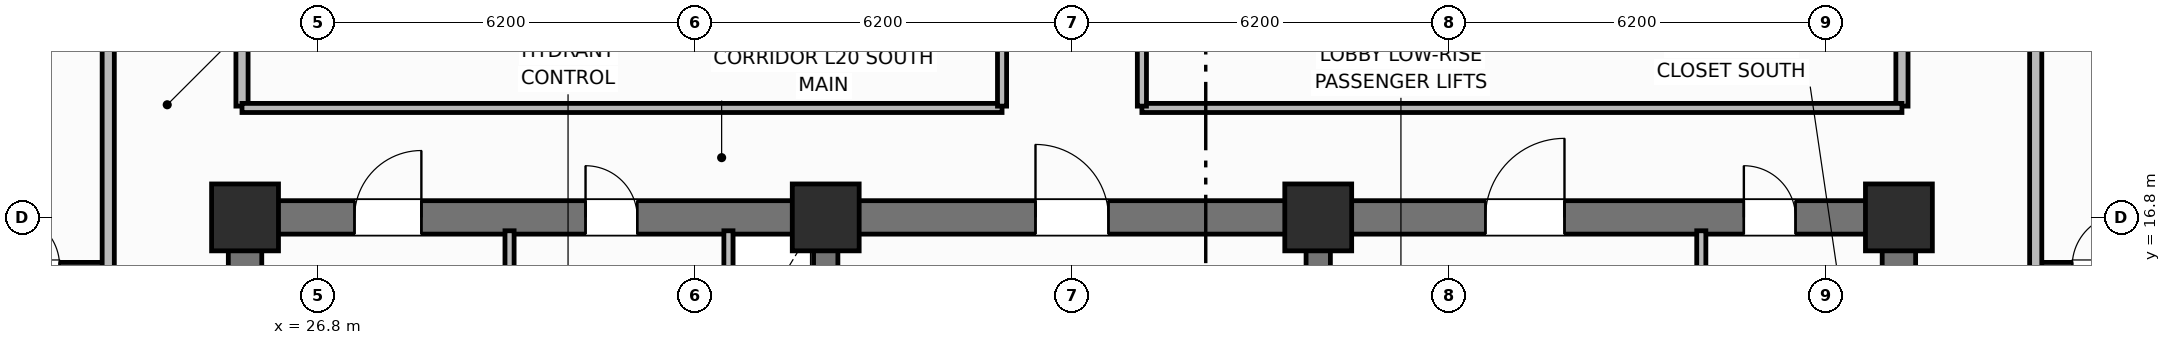
"""IFC4 building model, lengths in metres.
Left out: names, types, materials, properties, quantities, classifications, styles, units other than length and angle.
Written with IfcOpenShell. Run it as: python <this file> out.ifc"""

import sys

from ifc_helpers import new_model, si_unit, direction, frame, frame_2d, origin, origin_2d, place, context, subcontext, project, spatial, rectangle, extrude, element, fill, save


model = new_model("IFC4")
c1 = context("Model", 3, precision=1e-05, world=origin(), true_north=direction((0.0, 1.0)))
c2 = subcontext(c1, "Body", "Model", "MODEL_VIEW")
j1 = project(units=[si_unit("LENGTHUNIT", "METRE"), si_unit("PLANEANGLEUNIT", "RADIAN")], contexts=[c1])
p1 = place(None, origin())
s1 = spatial("IfcSite", under=j1, at=p1, CompositionType="ELEMENT")
p2 = place(p1, origin())
s2 = spatial("IfcBuilding", under=s1, at=p2, CompositionType="ELEMENT")
p3 = place(p2, frame((0.0, 0.0, 84.1)))
s3 = spatial("IfcBuildingStorey", under=s2, at=p3, CompositionType="ELEMENT", Elevation=84.1)
for number, where, z_axis, x_axis in (
    (1, (25.6, 10.875, 0.0), (0.0, 0.0, 1.0), (0.0, 1.0, 0.0)),
    (2, (52.8, 10.875, 0.0), (0.0, 0.0, 1.0), (0.0, 1.0, 0.0)),
):
    element("IfcWall", number, at=place(p3, frame(where, z_axis=z_axis, x_axis=x_axis)), inside=s3, PredefinedType="SHEAR", context=c2, shape_type="SweptSolid", body=[
        extrude(rectangle(XDim=5.65, YDim=0.55, at=frame_2d((2.825, 0.0))), origin(), (0.0, 0.0, 1.0), 4.2),
    ])
p4 = place(p3, frame((25.6, 16.8, 0.0), z_axis=(0.0, 0.0, 1.0), x_axis=(1.0, 0.0, 0.0)))
e3 = element("IfcWall", 3, at=p4, inside=s3, PredefinedType="SHEAR", context=c2, shape_type="SweptSolid", body=[
    extrude(rectangle(XDim=27.2, YDim=0.55, at=frame_2d((13.6, 0.0))), origin(), (0.0, 0.0, 1.0), 4.2),
])
p5 = place(p4, frame((1.8, 0.0, 0.0)))
e4 = element("IfcOpeningElement", 4, at=p5, cuts=e3, PredefinedType="OPENING", context=c2, shape_type="SweptSolid", body=[
    extrude(rectangle(XDim=1.1, YDim=2.15, at=frame_2d((0.55, 1.075))), frame((0.0, 0.285, 0.0), z_axis=(0.0, -1.0, 0.0), x_axis=(1.0, 0.0, 0.0)), (0.0, 0.0, 1.0), 0.57),
])
p6 = place(p4, frame((5.6, 0.0, 0.0)))
e5 = element("IfcOpeningElement", 5, at=p6, cuts=e3, PredefinedType="OPENING", context=c2, shape_type="SweptSolid", body=[
    extrude(rectangle(XDim=0.85, YDim=2.1, at=frame_2d((0.425, 1.05))), frame((0.0, 0.285, 0.0), z_axis=(0.0, -1.0, 0.0), x_axis=(1.0, 0.0, 0.0)), (0.0, 0.0, 1.0), 0.57),
])
p7 = place(p4, frame((13.0, 0.0, 0.0)))
e6 = element("IfcOpeningElement", 6, at=p7, cuts=e3, PredefinedType="OPENING", context=c2, shape_type="SweptSolid", body=[
    extrude(rectangle(XDim=1.2, YDim=2.15, at=frame_2d((0.6, 1.075))), frame((0.0, 0.285, 0.0), z_axis=(0.0, -1.0, 0.0), x_axis=(1.0, 0.0, 0.0)), (0.0, 0.0, 1.0), 0.57),
])
p8 = place(p4, frame((20.4, 0.0, 0.0)))
e7 = element("IfcOpeningElement", 7, at=p8, cuts=e3, PredefinedType="OPENING", context=c2, shape_type="SweptSolid", body=[
    extrude(rectangle(XDim=1.3, YDim=2.2, at=frame_2d((0.65, 1.1))), frame((0.0, 0.285, 0.0), z_axis=(0.0, -1.0, 0.0), x_axis=(1.0, 0.0, 0.0)), (0.0, 0.0, 1.0), 0.57),
])
p9 = place(p4, frame((24.65, 0.0, 0.0)))
e8 = element("IfcOpeningElement", 8, at=p9, cuts=e3, PredefinedType="OPENING", context=c2, shape_type="SweptSolid", body=[
    extrude(rectangle(XDim=0.85, YDim=2.1, at=frame_2d((0.425, 1.05))), frame((0.0, 0.285, 0.0), z_axis=(0.0, -1.0, 0.0), x_axis=(1.0, 0.0, 0.0)), (0.0, 0.0, 1.0), 0.57),
])
for number, where, z_axis, x_axis in (
    (9, (35.15, 10.875, 0.0), (0.0, 0.0, 1.0), (0.0, 1.0, 0.0)),
    (10, (43.25, 10.875, 0.0), (0.0, 0.0, 1.0), (0.0, 1.0, 0.0)),
):
    element("IfcWall", number, at=place(p3, frame(where, z_axis=z_axis, x_axis=x_axis)), inside=s3, PredefinedType="SHEAR", context=c2, shape_type="SweptSolid", body=[
        extrude(rectangle(XDim=5.65, YDim=0.4, at=frame_2d((2.825, 0.0))), origin(), (0.0, 0.0, 1.0), 4.2),
    ])
for number, where, z_axis, x_axis in (
    (11, (25.6, 16.8, 0.0), (0.0, 0.0, 1.0), (1.0, 0.0, 0.0)),
    (12, (35.15, 16.8, 0.0), (0.0, 0.0, 1.0), (1.0, 0.0, 0.0)),
    (13, (43.25, 16.8, 0.0), (0.0, 0.0, 1.0), (1.0, 0.0, 0.0)),
    (14, (52.8, 16.8, 0.0), (0.0, 0.0, 1.0), (1.0, 0.0, 0.0)),
):
    element("IfcColumn", number, at=place(p3, frame(where, z_axis=z_axis, x_axis=x_axis)), inside=s3, PredefinedType="COLUMN", context=c2, shape_type="SweptSolid", body=[
        extrude(rectangle(XDim=1.1, YDim=1.1, at=origin_2d()), origin(), (0.0, 0.0, 1.0), 4.2),
    ])
p10 = place(p3, frame((29.95, 14.5, 0.0), z_axis=(0.0, 0.0, 1.0), x_axis=(0.0, 1.0, 0.0)))
e15 = element("IfcWall", 15, at=p10, inside=s3, PredefinedType="PARTITIONING", context=c2, shape_type="SweptSolid", body=[
    extrude(rectangle(XDim=2.08, YDim=0.15, at=frame_2d((1.04, 0.0))), origin(), (0.0, 0.0, 1.0), 3.03),
])
p11 = place(p3, frame((33.55, 14.5, 0.0), z_axis=(0.0, 0.0, 1.0), x_axis=(0.0, 1.0, 0.0)))
e16 = element("IfcWall", 16, at=p11, inside=s3, PredefinedType="PARTITIONING", context=c2, shape_type="SweptSolid", body=[
    extrude(rectangle(XDim=2.08, YDim=0.15, at=frame_2d((1.04, 0.0))), origin(), (0.0, 0.0, 1.0), 3.03),
])
p12 = place(p11, frame((0.55, 0.0, 0.0)))
e17 = element("IfcOpeningElement", 17, at=p12, cuts=e16, PredefinedType="OPENING", context=c2, shape_type="SweptSolid", body=[
    extrude(rectangle(XDim=0.85, YDim=2.05, at=frame_2d((0.425, 1.025))), frame((0.0, 0.085, 0.0), z_axis=(0.0, -1.0, 0.0), x_axis=(1.0, 0.0, 0.0)), (0.0, 0.0, 1.0), 0.17),
])
p13 = place(p3, frame((49.55, 13.7, 0.0), z_axis=(0.0, 0.0, 1.0), x_axis=(0.0, 1.0, 0.0)))
e18 = element("IfcWall", 18, at=p13, inside=s3, PredefinedType="PARTITIONING", context=c2, shape_type="SweptSolid", body=[
    extrude(rectangle(XDim=2.88, YDim=0.15, at=frame_2d((1.44, 0.0))), origin(), (0.0, 0.0, 1.0), 3.03),
])
for number, where, z_axis, x_axis in (
    (19, (25.55, 18.63, 0.0), (0.0, 0.0, 1.0), (0.0, 1.0, 0.0)),
    (20, (52.85, 18.63, 0.0), (0.0, 0.0, 1.0), (0.0, 1.0, 0.0)),
):
    element("IfcWall", number, at=place(p3, frame(where, z_axis=z_axis, x_axis=x_axis)), inside=s3, PredefinedType="PARTITIONING", context=c2, shape_type="SweptSolid", body=[
        extrude(rectangle(XDim=19.14, YDim=0.2, at=frame_2d((9.57, 0.0))), origin(), (0.0, 0.0, 1.0), 3.03),
    ])
for number, where, z_axis, x_axis in (
    (21, (25.55, 18.6, 0.0), (0.0, 0.0, 1.0), (1.0, 0.0, 0.0)),
    (22, (40.35, 18.6, 0.0), (0.0, 0.0, 1.0), (1.0, 0.0, 0.0)),
):
    element("IfcWall", number, at=place(p3, frame(where, z_axis=z_axis, x_axis=x_axis)), inside=s3, PredefinedType="PARTITIONING", context=c2, shape_type="SweptSolid", body=[
        extrude(rectangle(XDim=12.5, YDim=0.15, at=frame_2d((6.25, 0.0))), origin(), (0.0, 0.0, 1.0), 3.03),
    ])
p14 = place(p3, frame((38.05, 18.63, 0.0), z_axis=(0.0, 0.0, 1.0), x_axis=(0.0, 1.0, 0.0)))
e23 = element("IfcWall", 23, at=p14, inside=s3, PredefinedType="PARTITIONING", context=c2, shape_type="SweptSolid", body=[
    extrude(rectangle(XDim=19.14, YDim=0.15, at=frame_2d((9.57, 0.0))), origin(), (0.0, 0.0, 1.0), 3.03),
])
p15 = place(p14, frame((4.0, 0.0, 0.0)))
e24 = element("IfcOpeningElement", 24, at=p15, cuts=e23, PredefinedType="OPENING", context=c2, shape_type="SweptSolid", body=[
    extrude(rectangle(XDim=1.3, YDim=2.2, at=frame_2d((0.65, 1.1))), frame((0.0, 0.085, 0.0), z_axis=(0.0, -1.0, 0.0), x_axis=(1.0, 0.0, 0.0)), (0.0, 0.0, 1.0), 0.17),
])
p16 = place(p3, frame((40.35, 18.63, 0.0), z_axis=(0.0, 0.0, 1.0), x_axis=(0.0, 1.0, 0.0)))
e25 = element("IfcWall", 25, at=p16, inside=s3, PredefinedType="PARTITIONING", context=c2, shape_type="SweptSolid", body=[
    extrude(rectangle(XDim=19.14, YDim=0.15, at=frame_2d((9.57, 0.0))), origin(), (0.0, 0.0, 1.0), 3.03),
])
p17 = place(p16, frame((2.2, 0.0, 0.0)))
e26 = element("IfcOpeningElement", 26, at=p17, cuts=e25, PredefinedType="OPENING", context=c2, shape_type="SweptSolid", body=[
    extrude(rectangle(XDim=1.0, YDim=2.15, at=frame_2d((0.5, 1.075))), frame((0.0, 0.085, 0.0), z_axis=(0.0, -1.0, 0.0), x_axis=(1.0, 0.0, 0.0)), (0.0, 0.0, 1.0), 0.17),
])
p18 = place(p16, frame((8.69, 0.0, 0.0)))
e27 = element("IfcOpeningElement", 27, at=p18, cuts=e25, PredefinedType="OPENING", context=c2, shape_type="SweptSolid", body=[
    extrude(rectangle(XDim=0.95, YDim=2.1, at=frame_2d((0.475, 1.05))), frame((0.0, 0.085, 0.0), z_axis=(0.0, -1.0, 0.0), x_axis=(1.0, 0.0, 0.0)), (0.0, 0.0, 1.0), 0.17),
])
p19 = place(p3, frame((21.1, 16.0, 0.0), z_axis=(0.0, 0.0, 1.0), x_axis=(1.0, 0.0, 0.0)))
e28 = element("IfcWall", 28, at=p19, inside=s3, PredefinedType="PARTITIONING", context=c2, shape_type="SweptSolid", body=[
    extrude(rectangle(XDim=2.25, YDim=0.12, at=frame_2d((1.125, 0.0))), origin(), (0.0, 0.0, 1.0), 3.03),
])
p20 = place(p19, frame((0.6, 0.0, 0.0)))
e29 = element("IfcOpeningElement", 29, at=p20, cuts=e28, PredefinedType="OPENING", context=c2, shape_type="SweptSolid", body=[
    extrude(rectangle(XDim=0.85, YDim=2.1, at=frame_2d((0.425, 1.05))), frame((0.0, 0.07, 0.0), z_axis=(0.0, -1.0, 0.0), x_axis=(1.0, 0.0, 0.0)), (0.0, 0.0, 1.0), 0.14),
])
p21 = place(p3, frame((23.35, 10.6, 0.0), z_axis=(0.0, 0.0, 1.0), x_axis=(0.0, 1.0, 0.0)))
e30 = element("IfcWall", 30, at=p21, inside=s3, PredefinedType="PARTITIONING", context=c2, shape_type="SweptSolid", body=[
    extrude(rectangle(XDim=35.2, YDim=0.2, at=frame_2d((17.6, 0.0))), origin(), (0.0, 0.0, 1.0), 3.03),
])
p22 = place(p21, frame((2.65, 0.0, 0.0)))
e31 = element("IfcOpeningElement", 31, at=p22, cuts=e30, PredefinedType="OPENING", context=c2, shape_type="SweptSolid", body=[
    extrude(rectangle(XDim=1.0, YDim=2.15, at=frame_2d((0.5, 1.075))), frame((0.0, 0.11, 0.0), z_axis=(0.0, -1.0, 0.0), x_axis=(1.0, 0.0, 0.0)), (0.0, 0.0, 1.0), 0.22),
])
p23 = place(p21, frame((19.95, 0.0, 0.0)))
e32 = element("IfcOpeningElement", 32, at=p23, cuts=e30, PredefinedType="OPENING", context=c2, shape_type="SweptSolid", body=[
    extrude(rectangle(XDim=1.0, YDim=2.15, at=frame_2d((0.5, 1.075))), frame((0.0, 0.11, 0.0), z_axis=(0.0, -1.0, 0.0), x_axis=(1.0, 0.0, 0.0)), (0.0, 0.0, 1.0), 0.22),
])
p24 = place(p3, frame((55.05, 16.0, 0.0), z_axis=(0.0, 0.0, 1.0), x_axis=(1.0, 0.0, 0.0)))
e33 = element("IfcWall", 33, at=p24, inside=s3, PredefinedType="PARTITIONING", context=c2, shape_type="SweptSolid", body=[
    extrude(rectangle(XDim=2.25, YDim=0.12, at=frame_2d((1.125, 0.0))), origin(), (0.0, 0.0, 1.0), 3.03),
])
p25 = place(p24, frame((0.6, 0.0, 0.0)))
e34 = element("IfcOpeningElement", 34, at=p25, cuts=e33, PredefinedType="OPENING", context=c2, shape_type="SweptSolid", body=[
    extrude(rectangle(XDim=0.85, YDim=2.1, at=frame_2d((0.425, 1.05))), frame((0.0, 0.07, 0.0), z_axis=(0.0, -1.0, 0.0), x_axis=(1.0, 0.0, 0.0)), (0.0, 0.0, 1.0), 0.14),
])
p26 = place(p3, frame((55.05, 10.6, 0.0), z_axis=(0.0, 0.0, 1.0), x_axis=(0.0, 1.0, 0.0)))
e35 = element("IfcWall", 35, at=p26, inside=s3, PredefinedType="PARTITIONING", context=c2, shape_type="SweptSolid", body=[
    extrude(rectangle(XDim=35.2, YDim=0.2, at=frame_2d((17.6, 0.0))), origin(), (0.0, 0.0, 1.0), 3.03),
])
p27 = place(p26, frame((2.65, 0.0, 0.0)))
e36 = element("IfcOpeningElement", 36, at=p27, cuts=e35, PredefinedType="OPENING", context=c2, shape_type="SweptSolid", body=[
    extrude(rectangle(XDim=1.0, YDim=2.15, at=frame_2d((0.5, 1.075))), frame((0.0, 0.11, 0.0), z_axis=(0.0, -1.0, 0.0), x_axis=(1.0, 0.0, 0.0)), (0.0, 0.0, 1.0), 0.22),
])
p28 = place(p26, frame((22.75, 0.0, 0.0)))
e37 = element("IfcOpeningElement", 37, at=p28, cuts=e35, PredefinedType="OPENING", context=c2, shape_type="SweptSolid", body=[
    extrude(rectangle(XDim=1.0, YDim=2.15, at=frame_2d((0.5, 1.075))), frame((0.0, 0.11, 0.0), z_axis=(0.0, -1.0, 0.0), x_axis=(1.0, 0.0, 0.0)), (0.0, 0.0, 1.0), 0.22),
])
p29 = place(p20, origin())
e38 = element("IfcDoor", 38, at=p29, inside=s3, OperationType="SINGLE_SWING_LEFT", PredefinedType="DOOR", context=c2, shape_type="SweptSolid", body=[
    extrude(rectangle(XDim=0.85, YDim=2.1, at=frame_2d((0.425, 1.05))), frame((0.0, 0.025, 0.0), z_axis=(0.0, -1.0, 0.0), x_axis=(1.0, 0.0, 0.0)), (0.0, 0.0, 1.0), 0.05),
])
fill(e29, e38)
p30 = place(p25, origin())
e39 = element("IfcDoor", 39, at=p30, inside=s3, OperationType="SINGLE_SWING_RIGHT", PredefinedType="DOOR", context=c2, shape_type="SweptSolid", body=[
    extrude(rectangle(XDim=0.85, YDim=2.1, at=frame_2d((0.425, 1.05))), frame((0.0, 0.025, 0.0), z_axis=(0.0, -1.0, 0.0), x_axis=(1.0, 0.0, 0.0)), (0.0, 0.0, 1.0), 0.05),
])
fill(e34, e39)
p31 = place(p5, origin())
e40 = element("IfcDoor", 40, at=p31, inside=s3, OperationType="SINGLE_SWING_RIGHT", PredefinedType="DOOR", context=c2, shape_type="SweptSolid", body=[
    extrude(rectangle(XDim=1.1, YDim=2.15, at=frame_2d((0.55, 1.075))), frame((0.0, 0.025, 0.0), z_axis=(0.0, -1.0, 0.0), x_axis=(1.0, 0.0, 0.0)), (0.0, 0.0, 1.0), 0.05),
])
fill(e4, e40)
p32 = place(p6, origin())
e41 = element("IfcDoor", 41, at=p32, inside=s3, OperationType="SINGLE_SWING_LEFT", PredefinedType="DOOR", context=c2, shape_type="SweptSolid", body=[
    extrude(rectangle(XDim=0.85, YDim=2.1, at=frame_2d((0.425, 1.05))), frame((0.0, 0.025, 0.0), z_axis=(0.0, -1.0, 0.0), x_axis=(1.0, 0.0, 0.0)), (0.0, 0.0, 1.0), 0.05),
])
fill(e5, e41)
p33 = place(p7, origin())
e42 = element("IfcDoor", 42, at=p33, inside=s3, OperationType="SINGLE_SWING_LEFT", PredefinedType="DOOR", context=c2, shape_type="SweptSolid", body=[
    extrude(rectangle(XDim=1.2, YDim=2.15, at=frame_2d((0.6, 1.075))), frame((0.0, 0.025, 0.0), z_axis=(0.0, -1.0, 0.0), x_axis=(1.0, 0.0, 0.0)), (0.0, 0.0, 1.0), 0.05),
])
fill(e6, e42)
p34 = place(p8, origin())
e43 = element("IfcDoor", 43, at=p34, inside=s3, OperationType="SINGLE_SWING_RIGHT", PredefinedType="DOOR", context=c2, shape_type="SweptSolid", body=[
    extrude(rectangle(XDim=1.3, YDim=2.2, at=frame_2d((0.65, 1.1))), frame((0.0, 0.025, 0.0), z_axis=(0.0, -1.0, 0.0), x_axis=(1.0, 0.0, 0.0)), (0.0, 0.0, 1.0), 0.05),
])
fill(e7, e43)
p35 = place(p9, origin())
e44 = element("IfcDoor", 44, at=p35, inside=s3, OperationType="SINGLE_SWING_LEFT", PredefinedType="DOOR", context=c2, shape_type="SweptSolid", body=[
    extrude(rectangle(XDim=0.85, YDim=2.1, at=frame_2d((0.425, 1.05))), frame((0.0, 0.025, 0.0), z_axis=(0.0, -1.0, 0.0), x_axis=(1.0, 0.0, 0.0)), (0.0, 0.0, 1.0), 0.05),
])
fill(e8, e44)
save(model, sys.argv[1])
